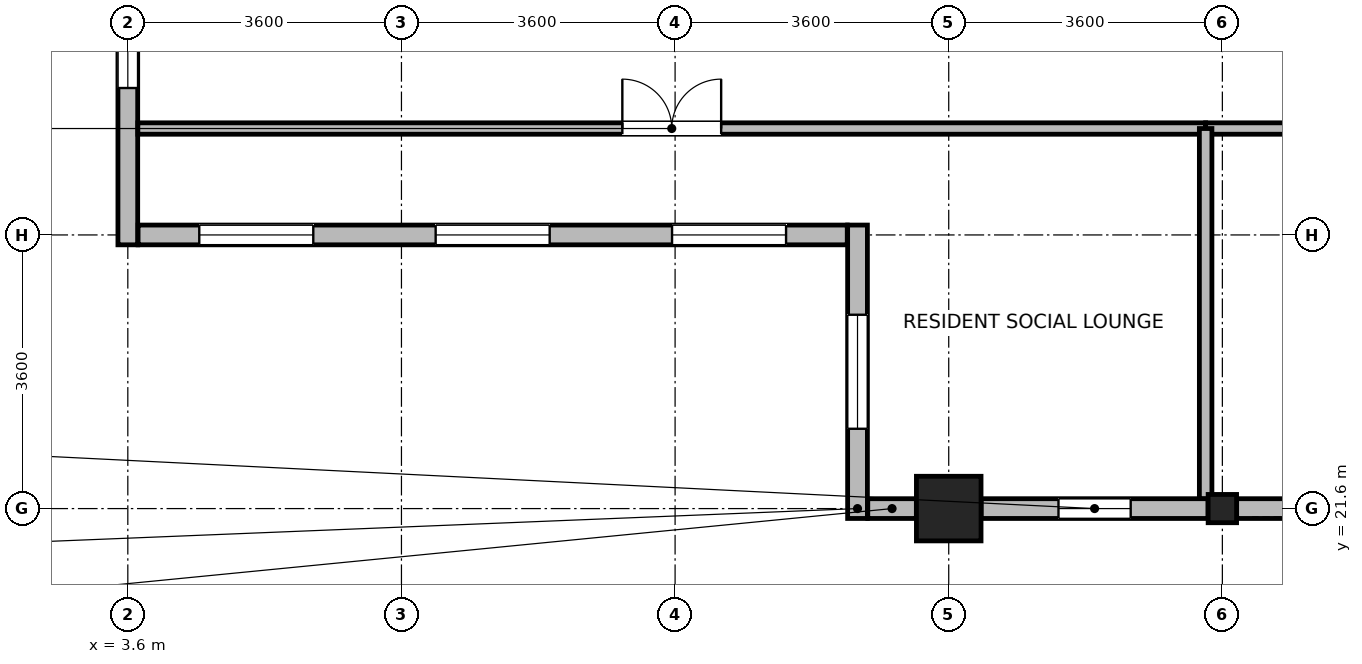
"""IFC4 building model, lengths in metres.
Left out: names, types, materials, properties, quantities, classifications, styles, units other than length and angle.
Written with IfcOpenShell. Run it as: python <this file> out.ifc"""

import sys

from ifc_helpers import new_model, si_unit, direction, frame, frame_2d, origin, origin_2d, place, context, subcontext, project, spatial, rectangle, i_section, extrude, source, transform, mapped, element, fill, save


model = new_model("IFC4")
c1 = context("Model", 3, precision=1e-05, world=origin(), true_north=direction((0.0, 1.0)))
c2 = subcontext(c1, "Body", "Model", "MODEL_VIEW")
j1 = project(units=[si_unit("LENGTHUNIT", "METRE"), si_unit("PLANEANGLEUNIT", "RADIAN")], contexts=[c1])
p1 = place(None, origin())
s1 = spatial("IfcSite", under=j1, at=p1, CompositionType="ELEMENT")
p2 = place(p1, origin())
s2 = spatial("IfcBuilding", under=s1, at=p2, CompositionType="ELEMENT")
p3 = place(p2, frame((0.0, 0.0, 294.3)))
s3 = spatial("IfcBuildingStorey", under=s2, at=p3, CompositionType="ELEMENT", Elevation=294.3)
m1 = source(origin(), c2, "Body", "SweptSolid", [
    extrude(rectangle(XDim=0.85, YDim=0.85, at=origin_2d()), origin(), (0.0, 0.0, 1.0), 3.7),
])
p4 = place(p3, frame((14.4, 21.6, 0.0), z_axis=(0.0, 0.0, 1.0), x_axis=(1.0, 0.0, 0.0)))
e1 = element("IfcColumn", 1, at=p4, inside=s3, PredefinedType="COLUMN", context=c2, shape_type="MappedRepresentation", body=[
    mapped(m1, transform((0.0, 0.0, 0.0), x_axis=(1.0, 0.0, 0.0), y_axis=(0.0, 1.0, 0.0), z_axis=(0.0, 0.0, 1.0), scale=1.0)),
])
m2 = source(origin(), c2, "Body", "SweptSolid", [
    extrude(i_section(OverallWidth=0.374, OverallDepth=0.372, WebThickness=0.015, FlangeThickness=0.026, FilletRadius=0.015, at=origin_2d()), origin(), (0.0, 0.0, 1.0), 3.7),
])
p5 = place(p3, frame((18.0, 21.6, 0.0), z_axis=(0.0, 0.0, 1.0), x_axis=(1.0, 0.0, 0.0)))
e2 = element("IfcColumn", 2, at=p5, inside=s3, PredefinedType="COLUMN", context=c2, shape_type="MappedRepresentation", body=[
    mapped(m2, transform((0.0, 0.0, 0.0), x_axis=(1.0, 0.0, 0.0), y_axis=(0.0, 1.0, 0.0), z_axis=(0.0, 0.0, 1.0), scale=1.0)),
])
p6 = place(p3, frame((13.974, 21.6, 0.0), z_axis=(0.0, 0.0, 1.0), x_axis=(-1.0, 0.0, 0.0)))
e3 = element("IfcWall", 3, at=p6, inside=s3, PredefinedType="STANDARD", context=c2, shape_type="SweptSolid", body=[
    extrude(rectangle(XDim=0.639, YDim=0.26, at=frame_2d((0.32, 0.0))), origin(), (0.0, 0.0, 1.0), 3.38),
])
p7 = place(p3, frame((17.812, 21.6, 0.0), z_axis=(0.0, 0.0, 1.0), x_axis=(-1.0, 0.0, 0.0)))
e4 = element("IfcWall", 4, at=p7, inside=s3, PredefinedType="STANDARD", context=c2, shape_type="SweptSolid", body=[
    extrude(rectangle(XDim=2.986, YDim=0.26, at=frame_2d((1.493, 0.0))), origin(), (0.0, 0.0, 1.0), 2.98),
])
p8 = place(p7, frame((1.018, 0.0, 0.85)))
e5 = element("IfcOpeningElement", 5, at=p8, cuts=e4, PredefinedType="OPENING", context=c2, shape_type="SweptSolid", body=[
    extrude(rectangle(XDim=0.95, YDim=1.75, at=frame_2d((0.475, 0.875))), frame((0.0, 0.14, 0.0), z_axis=(0.0, -1.0, 0.0), x_axis=(1.0, 0.0, 0.0)), (0.0, 0.0, 1.0), 0.28),
])
p9 = place(p3, frame((21.174, 21.6, 0.0), z_axis=(0.0, 0.0, 1.0), x_axis=(-1.0, 0.0, 0.0)))
e6 = element("IfcWall", 6, at=p9, inside=s3, PredefinedType="STANDARD", context=c2, shape_type="SweptSolid", body=[
    extrude(rectangle(XDim=2.986, YDim=0.26, at=frame_2d((1.493, 0.0))), origin(), (0.0, 0.0, 1.0), 2.98),
])
p10 = place(p9, frame((1.018, 0.0, 0.85)))
e7 = element("IfcOpeningElement", 7, at=p10, cuts=e6, PredefinedType="OPENING", context=c2, shape_type="SweptSolid", body=[
    extrude(rectangle(XDim=0.95, YDim=1.75, at=frame_2d((0.475, 0.875))), frame((0.0, 0.14, 0.0), z_axis=(0.0, -1.0, 0.0), x_axis=(1.0, 0.0, 0.0)), (0.0, 0.0, 1.0), 0.28),
])
p11 = place(p3, frame((3.6, 25.07, 0.0), z_axis=(0.0, 0.0, 1.0), x_axis=(0.0, 1.0, 0.0)))
e8 = element("IfcWall", 8, at=p11, inside=s3, PredefinedType="STANDARD", context=c2, shape_type="SweptSolid", body=[
    extrude(rectangle(XDim=3.393, YDim=0.26, at=frame_2d((1.696, 0.0))), origin(), (0.0, 0.0, 1.0), 3.38),
])
p12 = place(p11, frame((2.063, 0.0, 0.85)))
e9 = element("IfcOpeningElement", 9, at=p12, cuts=e8, PredefinedType="OPENING", context=c2, shape_type="SweptSolid", body=[
    extrude(rectangle(XDim=0.95, YDim=1.75, at=frame_2d((0.475, 0.875))), frame((0.0, 0.14, 0.0), z_axis=(0.0, -1.0, 0.0), x_axis=(1.0, 0.0, 0.0)), (0.0, 0.0, 1.0), 0.28),
])
p13 = place(p3, frame((13.065, 25.2, 0.0), z_axis=(0.0, 0.0, 1.0), x_axis=(-1.0, 0.0, 0.0)))
e10 = element("IfcWall", 10, at=p13, inside=s3, PredefinedType="STANDARD", context=c2, shape_type="SweptSolid", body=[
    extrude(rectangle(XDim=9.33, YDim=0.26, at=frame_2d((4.665, 0.0))), origin(), (0.0, 0.0, 1.0), 3.38),
])
p14 = place(p13, frame((0.805, 0.0, 0.85)))
e11 = element("IfcOpeningElement", 11, at=p14, cuts=e10, PredefinedType="OPENING", context=c2, shape_type="SweptSolid", body=[
    extrude(rectangle(XDim=1.5, YDim=1.85, at=frame_2d((0.75, 0.925))), frame((0.0, 0.14, 0.0), z_axis=(0.0, -1.0, 0.0), x_axis=(1.0, 0.0, 0.0)), (0.0, 0.0, 1.0), 0.28),
])
p15 = place(p13, frame((3.915, 0.0, 0.85)))
e12 = element("IfcOpeningElement", 12, at=p15, cuts=e10, PredefinedType="OPENING", context=c2, shape_type="SweptSolid", body=[
    extrude(rectangle(XDim=1.5, YDim=1.85, at=frame_2d((0.75, 0.925))), frame((0.0, 0.14, 0.0), z_axis=(0.0, -1.0, 0.0), x_axis=(1.0, 0.0, 0.0)), (0.0, 0.0, 1.0), 0.28),
])
p16 = place(p13, frame((7.025, 0.0, 0.85)))
e13 = element("IfcOpeningElement", 13, at=p16, cuts=e10, PredefinedType="OPENING", context=c2, shape_type="SweptSolid", body=[
    extrude(rectangle(XDim=1.5, YDim=1.85, at=frame_2d((0.75, 0.925))), frame((0.0, 0.14, 0.0), z_axis=(0.0, -1.0, 0.0), x_axis=(1.0, 0.0, 0.0)), (0.0, 0.0, 1.0), 0.28),
])
p17 = place(p3, frame((13.2, 21.47, 0.0), z_axis=(0.0, 0.0, 1.0), x_axis=(0.0, 1.0, 0.0)))
e14 = element("IfcWall", 14, at=p17, inside=s3, PredefinedType="STANDARD", context=c2, shape_type="SweptSolid", body=[
    extrude(rectangle(XDim=3.86, YDim=0.26, at=frame_2d((1.93, 0.0))), origin(), (0.0, 0.0, 1.0), 3.38),
])
p18 = place(p17, frame((1.18, 0.0, 0.85)))
e15 = element("IfcOpeningElement", 15, at=p18, cuts=e14, PredefinedType="OPENING", context=c2, shape_type="SweptSolid", body=[
    extrude(rectangle(XDim=1.5, YDim=1.85, at=frame_2d((0.75, 0.925))), frame((0.0, 0.14, 0.0), z_axis=(0.0, -1.0, 0.0), x_axis=(1.0, 0.0, 0.0)), (0.0, 0.0, 1.0), 0.28),
])
p19 = place(p3, frame((3.732, 26.6, 0.0), z_axis=(0.0, 0.0, 1.0), x_axis=(1.0, 0.0, 0.0)))
e16 = element("IfcWall", 16, at=p19, inside=s3, PredefinedType="PARTITIONING", context=c2, shape_type="SweptSolid", body=[
    extrude(rectangle(XDim=14.048, YDim=0.15, at=frame_2d((7.024, 0.0))), origin(), (0.0, 0.0, 1.0), 3.38),
])
p20 = place(p19, frame((6.374, 0.0, 0.0)))
e17 = element("IfcOpeningElement", 17, at=p20, cuts=e16, PredefinedType="OPENING", context=c2, shape_type="SweptSolid", body=[
    extrude(rectangle(XDim=1.3, YDim=2.12, at=frame_2d((0.65, 1.06))), frame((0.0, 0.085, 0.0), z_axis=(0.0, -1.0, 0.0), x_axis=(1.0, 0.0, 0.0)), (0.0, 0.0, 1.0), 0.17),
])
p21 = place(p3, frame((17.78, 26.6, 0.0), z_axis=(0.0, 0.0, 1.0), x_axis=(1.0, 0.0, 0.0)))
e18 = element("IfcWall", 18, at=p21, inside=s3, PredefinedType="PARTITIONING", context=c2, shape_type="SweptSolid", body=[
    extrude(rectangle(XDim=12.94, YDim=0.15, at=frame_2d((6.47, 0.0))), origin(), (0.0, 0.0, 1.0), 3.38),
])
p22 = place(p21, frame((6.02, 0.0, 0.0)))
e19 = element("IfcOpeningElement", 19, at=p22, cuts=e18, PredefinedType="OPENING", context=c2, shape_type="SweptSolid", body=[
    extrude(rectangle(XDim=0.9, YDim=2.08, at=frame_2d((0.45, 1.04))), frame((0.0, 0.085, 0.0), z_axis=(0.0, -1.0, 0.0), x_axis=(1.0, 0.0, 0.0)), (0.0, 0.0, 1.0), 0.17),
])
p23 = place(p3, frame((17.78, 21.732, 0.0), z_axis=(0.0, 0.0, 1.0), x_axis=(0.0, 1.0, 0.0)))
e20 = element("IfcWall", 20, at=p23, inside=s3, PredefinedType="PARTITIONING", context=c2, shape_type="SweptSolid", body=[
    extrude(rectangle(XDim=4.868, YDim=0.165, at=frame_2d((2.434, 0.0))), origin(), (0.0, 0.0, 1.0), 3.38),
])
p24 = place(p8, origin())
e21 = element("IfcWindow", 21, at=p24, inside=s3, PartitioningType="SINGLE_PANEL", PredefinedType="WINDOW", context=c2, shape_type="SweptSolid", body=[
    extrude(rectangle(XDim=0.95, YDim=1.75, at=frame_2d((0.475, 0.875))), frame((0.0, 0.03, 0.0), z_axis=(0.0, -1.0, 0.0), x_axis=(1.0, 0.0, 0.0)), (0.0, 0.0, 1.0), 0.06),
])
fill(e5, e21)
p25 = place(p12, origin())
e22 = element("IfcWindow", 22, at=p25, inside=s3, PartitioningType="SINGLE_PANEL", PredefinedType="WINDOW", context=c2, shape_type="SweptSolid", body=[
    extrude(rectangle(XDim=0.95, YDim=1.75, at=frame_2d((0.475, 0.875))), frame((0.0, 0.03, 0.0), z_axis=(0.0, -1.0, 0.0), x_axis=(1.0, 0.0, 0.0)), (0.0, 0.0, 1.0), 0.06),
])
fill(e9, e22)
p26 = place(p14, origin())
e23 = element("IfcWindow", 23, at=p26, inside=s3, PartitioningType="SINGLE_PANEL", PredefinedType="WINDOW", context=c2, shape_type="SweptSolid", body=[
    extrude(rectangle(XDim=1.5, YDim=1.85, at=frame_2d((0.75, 0.925))), frame((0.0, 0.03, 0.0), z_axis=(0.0, -1.0, 0.0), x_axis=(1.0, 0.0, 0.0)), (0.0, 0.0, 1.0), 0.06),
])
fill(e11, e23)
p27 = place(p15, origin())
e24 = element("IfcWindow", 24, at=p27, inside=s3, PartitioningType="SINGLE_PANEL", PredefinedType="WINDOW", context=c2, shape_type="SweptSolid", body=[
    extrude(rectangle(XDim=1.5, YDim=1.85, at=frame_2d((0.75, 0.925))), frame((0.0, 0.03, 0.0), z_axis=(0.0, -1.0, 0.0), x_axis=(1.0, 0.0, 0.0)), (0.0, 0.0, 1.0), 0.06),
])
fill(e12, e24)
p28 = place(p16, origin())
e25 = element("IfcWindow", 25, at=p28, inside=s3, PartitioningType="SINGLE_PANEL", PredefinedType="WINDOW", context=c2, shape_type="SweptSolid", body=[
    extrude(rectangle(XDim=1.5, YDim=1.85, at=frame_2d((0.75, 0.925))), frame((0.0, 0.03, 0.0), z_axis=(0.0, -1.0, 0.0), x_axis=(1.0, 0.0, 0.0)), (0.0, 0.0, 1.0), 0.06),
])
fill(e13, e25)
p29 = place(p18, origin())
e26 = element("IfcWindow", 26, at=p29, inside=s3, PartitioningType="SINGLE_PANEL", PredefinedType="WINDOW", context=c2, shape_type="SweptSolid", body=[
    extrude(rectangle(XDim=1.5, YDim=1.85, at=frame_2d((0.75, 0.925))), frame((0.0, 0.03, 0.0), z_axis=(0.0, -1.0, 0.0), x_axis=(1.0, 0.0, 0.0)), (0.0, 0.0, 1.0), 0.06),
])
fill(e15, e26)
p30 = place(p20, origin())
e27 = element("IfcDoor", 27, at=p30, inside=s3, OperationType="DOUBLE_DOOR_SINGLE_SWING", PredefinedType="DOOR", context=c2, shape_type="SweptSolid", body=[
    extrude(rectangle(XDim=1.3, YDim=2.12, at=frame_2d((0.65, 1.06))), frame((0.0, 0.025, 0.0), z_axis=(0.0, -1.0, 0.0), x_axis=(1.0, 0.0, 0.0)), (0.0, 0.0, 1.0), 0.05),
])
fill(e17, e27)
save(model, sys.argv[1])
